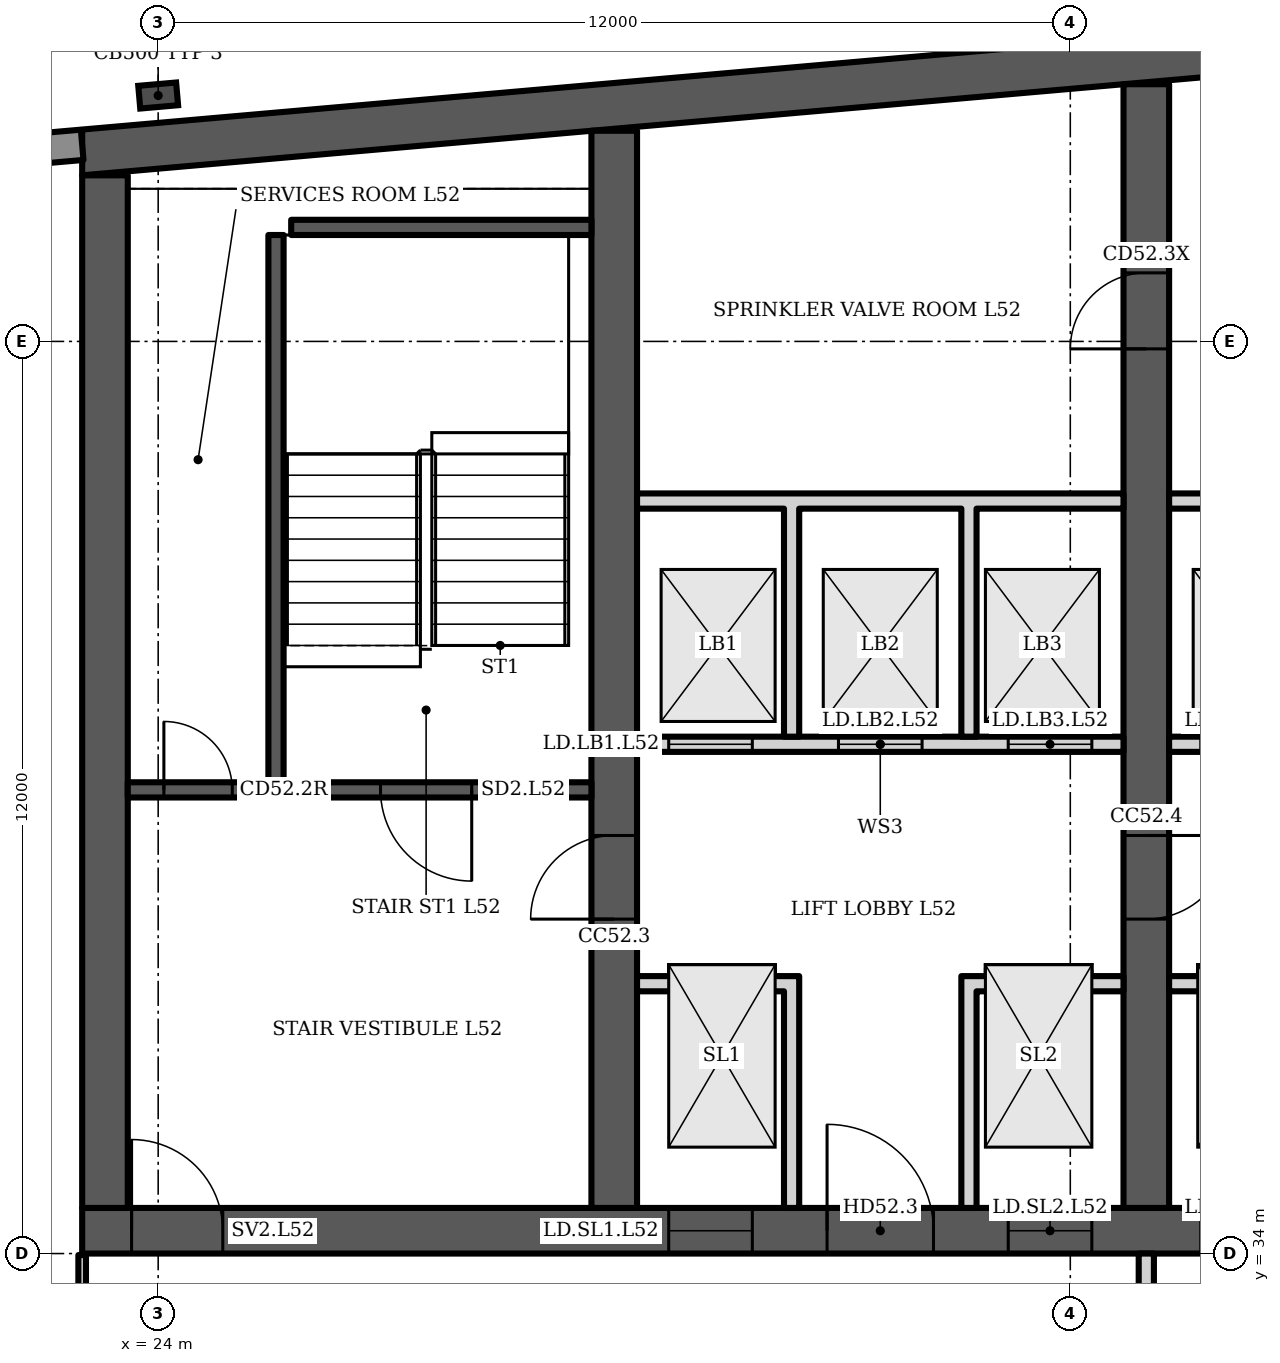
"""IFC4 building model, lengths in metres.
Left out: names, types, materials, properties, quantities, classifications, styles, units other than length and angle.
Written with IfcOpenShell. Run it as: python <this file> out.ifc"""

import sys

from ifc_helpers import new_model, si_unit, direction, frame, frame_2d, origin, origin_2d, place, context, subcontext, project, spatial, polyline, rectangle, i_section, outline, extrude, element, fill, save


model = new_model("IFC4")
c1 = context("Model", 3, precision=1e-05, world=origin(), true_north=direction((0.0, 1.0)))
c2 = subcontext(c1, "Body", "Model", "MODEL_VIEW")
j1 = project(units=[si_unit("LENGTHUNIT", "METRE"), si_unit("PLANEANGLEUNIT", "RADIAN")], contexts=[c1])
p1 = place(None, origin())
s1 = spatial("IfcSite", under=j1, at=p1, CompositionType="ELEMENT")
p2 = place(p1, origin())
s2 = spatial("IfcBuilding", under=s1, at=p2, CompositionType="ELEMENT")
p3 = place(p2, frame((0.0, 0.0, 210.7)))
s3 = spatial("IfcBuildingStorey", under=s2, at=p3, CompositionType="ELEMENT", Elevation=210.7)
p4 = place(p3, origin())
e1 = element("IfcWall", 1, at=p4, inside=s3, PredefinedType="SHEAR", context=c2, shape_type="SweptSolid", body=[
    extrude(outline(polyline([(23.0, 48.185), (40.5, 49.716), (58.0, 48.185), (58.0, 48.787), (40.5, 50.318), (23.0, 48.787), (23.0, 48.185)])), origin(), (0.0, 0.0, 1.0), 3.6),
])
p5 = place(p3, frame((23.0, 34.3, 0.0), z_axis=(0.0, 0.0, 1.0), x_axis=(1.0, 0.0, 0.0)))
e2 = element("IfcWall", 2, at=p5, inside=s3, PredefinedType="SHEAR", context=c2, shape_type="SweptSolid", body=[
    extrude(rectangle(XDim=35.0, YDim=0.6, at=frame_2d((17.5, 0.0))), origin(), (0.0, 0.0, 1.0), 3.6),
])
p6 = place(p5, frame((0.65, 0.0, 0.0)))
e3 = element("IfcOpeningElement", 3, at=p6, cuts=e2, PredefinedType="OPENING", context=c2, shape_type="SweptSolid", body=[
    extrude(rectangle(XDim=1.2, YDim=2.1, at=frame_2d((0.6, 1.05))), frame((0.0, 0.31, 0.0), z_axis=(0.0, -1.0, 0.0), x_axis=(1.0, 0.0, 0.0)), (0.0, 0.0, 1.0), 0.62),
])
p7 = place(p5, frame((7.717, 0.0, 0.0)))
e4 = element("IfcOpeningElement", 4, at=p7, cuts=e2, PredefinedType="OPENING", context=c2, shape_type="SweptSolid", body=[
    extrude(rectangle(XDim=1.1, YDim=2.1, at=frame_2d((0.55, 1.05))), frame((0.0, 0.31, 0.0), z_axis=(0.0, -1.0, 0.0), x_axis=(1.0, 0.0, 0.0)), (0.0, 0.0, 1.0), 0.62),
])
p8 = place(p5, frame((12.183, 0.0, 0.0)))
e5 = element("IfcOpeningElement", 5, at=p8, cuts=e2, PredefinedType="OPENING", context=c2, shape_type="SweptSolid", body=[
    extrude(rectangle(XDim=1.1, YDim=2.1, at=frame_2d((0.55, 1.05))), frame((0.0, 0.31, 0.0), z_axis=(0.0, -1.0, 0.0), x_axis=(1.0, 0.0, 0.0)), (0.0, 0.0, 1.0), 0.62),
])
p9 = place(p5, frame((9.8, 0.0, 0.0)))
e6 = element("IfcOpeningElement", 6, at=p9, cuts=e2, PredefinedType="OPENING", context=c2, shape_type="SweptSolid", body=[
    extrude(rectangle(XDim=1.4, YDim=2.1, at=frame_2d((0.7, 1.05))), frame((0.0, 0.31, 0.0), z_axis=(0.0, -1.0, 0.0), x_axis=(1.0, 0.0, 0.0)), (0.0, 0.0, 1.0), 0.62),
])
p10 = place(p5, frame((14.717, 0.0, 0.0)))
e7 = element("IfcOpeningElement", 7, at=p10, cuts=e2, PredefinedType="OPENING", context=c2, shape_type="SweptSolid", body=[
    extrude(rectangle(XDim=1.1, YDim=2.1, at=frame_2d((0.55, 1.05))), frame((0.0, 0.31, 0.0), z_axis=(0.0, -1.0, 0.0), x_axis=(1.0, 0.0, 0.0)), (0.0, 0.0, 1.0), 0.62),
])
p11 = place(p5, frame((16.95, 0.0, 0.0)))
e8 = element("IfcOpeningElement", 8, at=p11, cuts=e2, PredefinedType="OPENING", context=c2, shape_type="SweptSolid", body=[
    extrude(rectangle(XDim=1.1, YDim=2.1, at=frame_2d((0.55, 1.05))), frame((0.0, 0.31, 0.0), z_axis=(0.0, -1.0, 0.0), x_axis=(1.0, 0.0, 0.0)), (0.0, 0.0, 1.0), 0.62),
])
p12 = place(p5, frame((19.183, 0.0, 0.0)))
e9 = element("IfcOpeningElement", 9, at=p12, cuts=e2, PredefinedType="OPENING", context=c2, shape_type="SweptSolid", body=[
    extrude(rectangle(XDim=1.1, YDim=2.1, at=frame_2d((0.55, 1.05))), frame((0.0, 0.31, 0.0), z_axis=(0.0, -1.0, 0.0), x_axis=(1.0, 0.0, 0.0)), (0.0, 0.0, 1.0), 0.62),
])
p13 = place(p5, frame((26.15, 0.0, 0.0)))
e10 = element("IfcOpeningElement", 10, at=p13, cuts=e2, PredefinedType="OPENING", context=c2, shape_type="SweptSolid", body=[
    extrude(rectangle(XDim=1.2, YDim=2.1, at=frame_2d((0.6, 1.05))), frame((0.0, 0.31, 0.0), z_axis=(0.0, -1.0, 0.0), x_axis=(1.0, 0.0, 0.0)), (0.0, 0.0, 1.0), 0.62),
])
p14 = place(p5, frame((28.767, 0.0, 0.0)))
e11 = element("IfcOpeningElement", 11, at=p14, cuts=e2, PredefinedType="OPENING", context=c2, shape_type="SweptSolid", body=[
    extrude(rectangle(XDim=1.0, YDim=2.1, at=frame_2d((0.5, 1.05))), frame((0.0, 0.31, 0.0), z_axis=(0.0, -1.0, 0.0), x_axis=(1.0, 0.0, 0.0)), (0.0, 0.0, 1.0), 0.62),
])
p15 = place(p5, frame((33.083, 0.0, 0.0)))
e12 = element("IfcOpeningElement", 12, at=p15, cuts=e2, PredefinedType="OPENING", context=c2, shape_type="SweptSolid", body=[
    extrude(rectangle(XDim=1.0, YDim=2.1, at=frame_2d((0.5, 1.05))), frame((0.0, 0.31, 0.0), z_axis=(0.0, -1.0, 0.0), x_axis=(1.0, 0.0, 0.0)), (0.0, 0.0, 1.0), 0.62),
])
p16 = place(p5, frame((30.8, 0.0, 0.0)))
e13 = element("IfcOpeningElement", 13, at=p16, cuts=e2, PredefinedType="OPENING", context=c2, shape_type="SweptSolid", body=[
    extrude(rectangle(XDim=1.4, YDim=2.1, at=frame_2d((0.7, 1.05))), frame((0.0, 0.31, 0.0), z_axis=(0.0, -1.0, 0.0), x_axis=(1.0, 0.0, 0.0)), (0.0, 0.0, 1.0), 0.62),
])
p17 = place(p3, frame((23.3, 34.6, 0.0), z_axis=(0.0, 0.0, 1.0), x_axis=(0.0, 1.0, 0.0)))
e14 = element("IfcWall", 14, at=p17, inside=s3, PredefinedType="SHEAR", context=c2, shape_type="SweptSolid", body=[
    extrude(rectangle(XDim=13.585, YDim=0.6, at=frame_2d((6.792, 0.0))), origin(), (0.0, 0.0, 1.0), 3.6),
])
p18 = place(p3, frame((30.0, 34.6, 0.0), z_axis=(0.0, 0.0, 1.0), x_axis=(0.0, 1.0, 0.0)))
e15 = element("IfcWall", 15, at=p18, inside=s3, PredefinedType="SHEAR", context=c2, shape_type="SweptSolid", body=[
    extrude(rectangle(XDim=14.171, YDim=0.6, at=frame_2d((7.085, 0.0))), origin(), (0.0, 0.0, 1.0), 3.6),
])
p19 = place(p18, frame((3.8, 0.0, 0.0)))
e16 = element("IfcOpeningElement", 16, at=p19, cuts=e15, PredefinedType="OPENING", context=c2, shape_type="SweptSolid", body=[
    extrude(rectangle(XDim=1.1, YDim=2.1, at=frame_2d((0.55, 1.05))), frame((0.0, 0.31, 0.0), z_axis=(0.0, -1.0, 0.0), x_axis=(1.0, 0.0, 0.0)), (0.0, 0.0, 1.0), 0.62),
])
p20 = place(p3, frame((37.0, 34.6, 0.0), z_axis=(0.0, 0.0, 1.0), x_axis=(0.0, 1.0, 0.0)))
e17 = element("IfcWall", 17, at=p20, inside=s3, PredefinedType="SHEAR", context=c2, shape_type="SweptSolid", body=[
    extrude(rectangle(XDim=14.784, YDim=0.6, at=frame_2d((7.392, 0.0))), origin(), (0.0, 0.0, 1.0), 3.6),
])
p21 = place(p20, frame((11.302, 0.0, 0.0)))
e18 = element("IfcOpeningElement", 18, at=p21, cuts=e17, PredefinedType="OPENING", context=c2, shape_type="SweptSolid", body=[
    extrude(rectangle(XDim=1.0, YDim=2.1, at=frame_2d((0.5, 1.05))), frame((0.0, 0.31, 0.0), z_axis=(0.0, -1.0, 0.0), x_axis=(1.0, 0.0, 0.0)), (0.0, 0.0, 1.0), 0.62),
])
p22 = place(p20, frame((3.8, 0.0, 0.0)))
e19 = element("IfcOpeningElement", 19, at=p22, cuts=e17, PredefinedType="OPENING", context=c2, shape_type="SweptSolid", body=[
    extrude(rectangle(XDim=1.1, YDim=2.1, at=frame_2d((0.55, 1.05))), frame((0.0, 0.31, 0.0), z_axis=(0.0, -1.0, 0.0), x_axis=(1.0, 0.0, 0.0)), (0.0, 0.0, 1.0), 0.62),
])
p23 = place(p3, frame((24.0, 49.235, 0.0), z_axis=(0.0, 0.0, 1.0), x_axis=(-0.087156, 0.996197, 0.0)))
e20 = element("IfcColumn", 20, at=p23, inside=s3, PredefinedType="COLUMN", context=c2, shape_type="SweptSolid", body=[
    extrude(i_section(OverallWidth=0.3, OverallDepth=0.5, WebThickness=0.014, FlangeThickness=0.028, FilletRadius=0.027, at=origin_2d()), origin(), (0.0, 0.0, 1.0), 3.6),
])
p24 = place(p3, frame((23.0, 48.587, 0.0), z_axis=(0.0, 0.0, 1.0), x_axis=(-0.996194, -0.087168, 0.0)))
e21 = element("IfcWall", 21, at=p24, inside=s3, PredefinedType="SOLIDWALL", context=c2, shape_type="SweptSolid", body=[
    extrude(rectangle(XDim=2.994, YDim=0.4, at=frame_2d((1.497, 0.0))), origin(), (0.0, 0.0, 1.0), 3.2),
])
p25 = place(p3, frame((23.6, 40.1, 0.0), z_axis=(0.0, 0.0, 1.0), x_axis=(1.0, 0.0, 0.0)))
e22 = element("IfcWall", 22, at=p25, inside=s3, PredefinedType="SHEAR", context=c2, shape_type="SweptSolid", body=[
    extrude(rectangle(XDim=6.1, YDim=0.2, at=frame_2d((3.05, 0.0))), origin(), (0.0, 0.0, 1.0), 3.2),
])
p26 = place(p25, frame((3.325, 0.0, 0.0)))
e23 = element("IfcOpeningElement", 23, at=p26, cuts=e22, PredefinedType="OPENING", context=c2, shape_type="SweptSolid", body=[
    extrude(rectangle(XDim=1.2, YDim=2.1, at=frame_2d((0.6, 1.05))), frame((0.0, 0.11, 0.0), z_axis=(0.0, -1.0, 0.0), x_axis=(1.0, 0.0, 0.0)), (0.0, 0.0, 1.0), 0.22),
])
p27 = place(p25, frame((0.475, 0.0, 0.0)))
e24 = element("IfcOpeningElement", 24, at=p27, cuts=e22, PredefinedType="OPENING", context=c2, shape_type="SweptSolid", body=[
    extrude(rectangle(XDim=0.9, YDim=2.1, at=frame_2d((0.45, 1.05))), frame((0.0, 0.11, 0.0), z_axis=(0.0, -1.0, 0.0), x_axis=(1.0, 0.0, 0.0)), (0.0, 0.0, 1.0), 0.22),
])
p28 = place(p3, frame((25.55, 40.2, 0.0), z_axis=(0.0, 0.0, 1.0), x_axis=(0.0, 1.0, 0.0)))
e25 = element("IfcWall", 25, at=p28, inside=s3, PredefinedType="SHEAR", context=c2, shape_type="SweptSolid", body=[
    extrude(rectangle(XDim=7.2, YDim=0.2, at=frame_2d((3.6, 0.0))), origin(), (0.0, 0.0, 1.0), 3.2),
])
p29 = place(p3, frame((25.75, 47.5, 0.0), z_axis=(0.0, 0.0, 1.0), x_axis=(1.0, 0.0, 0.0)))
e26 = element("IfcWall", 26, at=p29, inside=s3, PredefinedType="SHEAR", context=c2, shape_type="SweptSolid", body=[
    extrude(rectangle(XDim=3.95, YDim=0.2, at=frame_2d((1.975, 0.0))), origin(), (0.0, 0.0, 1.0), 3.2),
])
p30 = place(p3, frame((30.3, 40.7, 0.0), z_axis=(0.0, 0.0, 1.0), x_axis=(1.0, 0.0, 0.0)))
e27 = element("IfcWall", 27, at=p30, inside=s3, PredefinedType="PARTITIONING", context=c2, shape_type="SweptSolid", body=[
    extrude(rectangle(XDim=6.4, YDim=0.2, at=frame_2d((3.2, 0.0))), origin(), (0.0, 0.0, 1.0), 3.2),
])
p31 = place(p30, frame((0.417, 0.0, 0.0)))
e28 = element("IfcOpeningElement", 28, at=p31, cuts=e27, PredefinedType="OPENING", context=c2, shape_type="SweptSolid", body=[
    extrude(rectangle(XDim=1.1, YDim=2.1, at=frame_2d((0.55, 1.05))), frame((0.0, 0.11, 0.0), z_axis=(0.0, -1.0, 0.0), x_axis=(1.0, 0.0, 0.0)), (0.0, 0.0, 1.0), 0.22),
])
p32 = place(p30, frame((2.65, 0.0, 0.0)))
e29 = element("IfcOpeningElement", 29, at=p32, cuts=e27, PredefinedType="OPENING", context=c2, shape_type="SweptSolid", body=[
    extrude(rectangle(XDim=1.1, YDim=2.1, at=frame_2d((0.55, 1.05))), frame((0.0, 0.11, 0.0), z_axis=(0.0, -1.0, 0.0), x_axis=(1.0, 0.0, 0.0)), (0.0, 0.0, 1.0), 0.22),
])
p33 = place(p30, frame((4.883, 0.0, 0.0)))
e30 = element("IfcOpeningElement", 30, at=p33, cuts=e27, PredefinedType="OPENING", context=c2, shape_type="SweptSolid", body=[
    extrude(rectangle(XDim=1.1, YDim=2.1, at=frame_2d((0.55, 1.05))), frame((0.0, 0.11, 0.0), z_axis=(0.0, -1.0, 0.0), x_axis=(1.0, 0.0, 0.0)), (0.0, 0.0, 1.0), 0.22),
])
p34 = place(p3, frame((0.0, 0.0, -0.0)))
e31 = element("IfcWall", 31, at=p34, inside=s3, PredefinedType="PARTITIONING", context=c2, shape_type="SweptSolid", body=[
    extrude(outline(polyline([(32.233, 37.45), (30.3, 37.45), (30.3, 37.65), (32.233, 37.65), (32.433, 37.65), (32.433, 34.6), (32.233, 34.6), (32.233, 37.45)])), origin(), (0.0, 0.0, 1.0), 3.2),
])
p35 = place(p3, frame((0.0, 0.0, -0.0)))
e32 = element("IfcWall", 32, at=p35, inside=s3, PredefinedType="PARTITIONING", context=c2, shape_type="SweptSolid", body=[
    extrude(outline(polyline([(34.567, 37.65), (34.767, 37.65), (36.7, 37.65), (36.7, 37.45), (34.767, 37.45), (34.767, 34.6), (34.567, 34.6), (34.567, 37.65)])), origin(), (0.0, 0.0, 1.0), 3.2),
])
p36 = place(p3, frame((0.0, 0.0, -0.0)))
e33 = element("IfcWall", 33, at=p36, inside=s3, PredefinedType="PARTITIONING", context=c2, shape_type="SweptSolid", body=[
    extrude(outline(polyline([(32.433, 40.8), (32.233, 40.8), (32.233, 43.8), (30.3, 43.8), (30.3, 44.0), (36.7, 44.0), (36.7, 43.8), (34.767, 43.8), (34.767, 40.8), (34.567, 40.8), (34.567, 43.8), (32.433, 43.8), (32.433, 40.8)])), origin(), (0.0, 0.0, 1.0), 3.2),
])
p37 = place(p3, frame((37.3, 40.7, 0.0), z_axis=(0.0, 0.0, 1.0), x_axis=(1.0, 0.0, 0.0)))
e34 = element("IfcWall", 34, at=p37, inside=s3, PredefinedType="PARTITIONING", context=c2, shape_type="SweptSolid", body=[
    extrude(rectangle(XDim=6.4, YDim=0.2, at=frame_2d((3.2, 0.0))), origin(), (0.0, 0.0, 1.0), 3.2),
])
p38 = place(p37, frame((0.417, 0.0, 0.0)))
e35 = element("IfcOpeningElement", 35, at=p38, cuts=e34, PredefinedType="OPENING", context=c2, shape_type="SweptSolid", body=[
    extrude(rectangle(XDim=1.1, YDim=2.1, at=frame_2d((0.55, 1.05))), frame((0.0, 0.11, 0.0), z_axis=(0.0, -1.0, 0.0), x_axis=(1.0, 0.0, 0.0)), (0.0, 0.0, 1.0), 0.22),
])
p39 = place(p37, frame((2.65, 0.0, 0.0)))
e36 = element("IfcOpeningElement", 36, at=p39, cuts=e34, PredefinedType="OPENING", context=c2, shape_type="SweptSolid", body=[
    extrude(rectangle(XDim=1.1, YDim=2.1, at=frame_2d((0.55, 1.05))), frame((0.0, 0.11, 0.0), z_axis=(0.0, -1.0, 0.0), x_axis=(1.0, 0.0, 0.0)), (0.0, 0.0, 1.0), 0.22),
])
p40 = place(p37, frame((4.883, 0.0, 0.0)))
e37 = element("IfcOpeningElement", 37, at=p40, cuts=e34, PredefinedType="OPENING", context=c2, shape_type="SweptSolid", body=[
    extrude(rectangle(XDim=1.1, YDim=2.1, at=frame_2d((0.55, 1.05))), frame((0.0, 0.11, 0.0), z_axis=(0.0, -1.0, 0.0), x_axis=(1.0, 0.0, 0.0)), (0.0, 0.0, 1.0), 0.22),
])
p41 = place(p3, frame((0.0, 0.0, -0.0)))
e38 = element("IfcWall", 38, at=p41, inside=s3, PredefinedType="PARTITIONING", context=c2, shape_type="SweptSolid", body=[
    extrude(outline(polyline([(41.567, 37.1), (39.433, 37.1), (39.433, 34.6), (39.233, 34.6), (39.233, 37.45), (37.3, 37.45), (37.3, 37.65), (39.233, 37.65), (39.433, 37.65), (39.433, 37.3), (41.567, 37.3), (41.567, 37.35), (41.767, 37.35), (43.7, 37.35), (43.7, 37.15), (41.767, 37.15), (41.767, 34.6), (41.567, 34.6), (41.567, 37.1)])), origin(), (0.0, 0.0, 1.0), 3.2),
])
p42 = place(p3, frame((0.0, 0.0, -0.0)))
e39 = element("IfcWall", 39, at=p42, inside=s3, PredefinedType="PARTITIONING", context=c2, shape_type="SweptSolid", body=[
    extrude(outline(polyline([(39.433, 40.8), (39.233, 40.8), (39.233, 43.8), (37.3, 43.8), (37.3, 44.0), (43.7, 44.0), (43.7, 43.8), (41.767, 43.8), (41.767, 40.8), (41.567, 40.8), (41.567, 43.8), (39.433, 43.8), (39.433, 40.8)])), origin(), (0.0, 0.0, 1.0), 3.2),
])
p43 = place(p3, frame((37.0, 30.5, 0.0), z_axis=(0.0, 0.0, 1.0), x_axis=(0.0, 1.0, 0.0)))
e40 = element("IfcWall", 40, at=p43, inside=s3, PredefinedType="PARTITIONING", context=c2, shape_type="SweptSolid", body=[
    extrude(rectangle(XDim=3.5, YDim=0.2, at=frame_2d((1.75, 0.0))), origin(), (0.0, 0.0, 1.0), 3.2),
])
p44 = place(p43, frame((1.2, 0.0, 0.0)))
e41 = element("IfcOpeningElement", 41, at=p44, cuts=e40, PredefinedType="OPENING", context=c2, shape_type="SweptSolid", body=[
    extrude(rectangle(XDim=1.1, YDim=2.1, at=frame_2d((0.55, 1.05))), frame((0.0, 0.11, 0.0), z_axis=(0.0, -1.0, 0.0), x_axis=(1.0, 0.0, 0.0)), (0.0, 0.0, 1.0), 0.22),
])
p45 = place(p3, frame((23.0, 30.5, 0.0), z_axis=(0.0, 0.0, 1.0), x_axis=(0.0, 1.0, 0.0)))
e42 = element("IfcWall", 42, at=p45, inside=s3, PredefinedType="PARTITIONING", context=c2, shape_type="SweptSolid", body=[
    extrude(rectangle(XDim=3.48, YDim=0.1, at=frame_2d((1.74, 0.0))), origin(), (0.0, 0.0, 1.0), 3.2),
])
p46 = place(p45, frame((0.28, 0.0, 0.0)))
e43 = element("IfcOpeningElement", 43, at=p46, cuts=e42, PredefinedType="OPENING", context=c2, shape_type="SweptSolid", body=[
    extrude(rectangle(XDim=1.0, YDim=2.1, at=frame_2d((0.5, 1.05))), frame((0.0, 0.06, 0.0), z_axis=(0.0, -1.0, 0.0), x_axis=(1.0, 0.0, 0.0)), (0.0, 0.0, 1.0), 0.12),
])
p47 = place(p26, origin())
e44 = element("IfcDoor", 44, at=p47, inside=s3, OperationType="SINGLE_SWING_RIGHT", PredefinedType="DOOR", context=c2, shape_type="SweptSolid", body=[
    extrude(rectangle(XDim=1.2, YDim=2.1, at=frame_2d((0.6, 1.05))), frame((0.0, 0.025, 0.0), z_axis=(0.0, -1.0, 0.0), x_axis=(1.0, 0.0, 0.0)), (0.0, 0.0, 1.0), 0.05),
])
fill(e23, e44)
p48 = place(p27, origin())
e45 = element("IfcDoor", 45, at=p48, inside=s3, OperationType="SINGLE_SWING_LEFT", PredefinedType="DOOR", context=c2, shape_type="SweptSolid", body=[
    extrude(rectangle(XDim=0.9, YDim=2.1, at=frame_2d((0.45, 1.05))), frame((0.0, 0.025, 0.0), z_axis=(0.0, -1.0, 0.0), x_axis=(1.0, 0.0, 0.0)), (0.0, 0.0, 1.0), 0.05),
])
fill(e24, e45)
p49 = place(p6, origin())
e46 = element("IfcDoor", 46, at=p49, inside=s3, OperationType="SINGLE_SWING_LEFT", PredefinedType="DOOR", context=c2, shape_type="SweptSolid", body=[
    extrude(rectangle(XDim=1.2, YDim=2.1, at=frame_2d((0.6, 1.05))), frame((0.0, 0.025, 0.0), z_axis=(0.0, -1.0, 0.0), x_axis=(1.0, 0.0, 0.0)), (0.0, 0.0, 1.0), 0.05),
])
fill(e3, e46)
p50 = place(p7, origin())
e47 = element("IfcDoor", 47, at=p50, inside=s3, OperationType="DOUBLE_DOOR_SLIDING", PredefinedType="DOOR", context=c2, shape_type="SweptSolid", body=[
    extrude(rectangle(XDim=1.1, YDim=2.1, at=frame_2d((0.55, 1.05))), frame((0.0, 0.025, 0.0), z_axis=(0.0, -1.0, 0.0), x_axis=(1.0, 0.0, 0.0)), (0.0, 0.0, 1.0), 0.05),
])
fill(e4, e47)
p51 = place(p8, origin())
e48 = element("IfcDoor", 48, at=p51, inside=s3, OperationType="DOUBLE_DOOR_SLIDING", PredefinedType="DOOR", context=c2, shape_type="SweptSolid", body=[
    extrude(rectangle(XDim=1.1, YDim=2.1, at=frame_2d((0.55, 1.05))), frame((0.0, 0.025, 0.0), z_axis=(0.0, -1.0, 0.0), x_axis=(1.0, 0.0, 0.0)), (0.0, 0.0, 1.0), 0.05),
])
fill(e5, e48)
p52 = place(p9, origin())
e49 = element("IfcDoor", 49, at=p52, inside=s3, OperationType="DOUBLE_DOOR_SINGLE_SWING", PredefinedType="DOOR", context=c2, shape_type="SweptSolid", body=[
    extrude(rectangle(XDim=1.4, YDim=2.1, at=frame_2d((0.7, 1.05))), frame((0.0, 0.025, 0.0), z_axis=(0.0, -1.0, 0.0), x_axis=(1.0, 0.0, 0.0)), (0.0, 0.0, 1.0), 0.05),
])
fill(e6, e49)
p53 = place(p31, origin())
e50 = element("IfcDoor", 50, at=p53, inside=s3, OperationType="DOUBLE_DOOR_SLIDING", PredefinedType="DOOR", context=c2, shape_type="SweptSolid", body=[
    extrude(rectangle(XDim=1.1, YDim=2.1, at=frame_2d((0.55, 1.05))), frame((0.0, 0.025, 0.0), z_axis=(0.0, -1.0, 0.0), x_axis=(1.0, 0.0, 0.0)), (0.0, 0.0, 1.0), 0.05),
])
fill(e28, e50)
p54 = place(p32, origin())
e51 = element("IfcDoor", 51, at=p54, inside=s3, OperationType="DOUBLE_DOOR_SLIDING", PredefinedType="DOOR", context=c2, shape_type="SweptSolid", body=[
    extrude(rectangle(XDim=1.1, YDim=2.1, at=frame_2d((0.55, 1.05))), frame((0.0, 0.025, 0.0), z_axis=(0.0, -1.0, 0.0), x_axis=(1.0, 0.0, 0.0)), (0.0, 0.0, 1.0), 0.05),
])
fill(e29, e51)
p55 = place(p33, origin())
e52 = element("IfcDoor", 52, at=p55, inside=s3, OperationType="DOUBLE_DOOR_SLIDING", PredefinedType="DOOR", context=c2, shape_type="SweptSolid", body=[
    extrude(rectangle(XDim=1.1, YDim=2.1, at=frame_2d((0.55, 1.05))), frame((0.0, 0.025, 0.0), z_axis=(0.0, -1.0, 0.0), x_axis=(1.0, 0.0, 0.0)), (0.0, 0.0, 1.0), 0.05),
])
fill(e30, e52)
p56 = place(p21, origin())
e53 = element("IfcDoor", 53, at=p56, inside=s3, OperationType="SINGLE_SWING_LEFT", PredefinedType="DOOR", context=c2, shape_type="SweptSolid", body=[
    extrude(rectangle(XDim=1.0, YDim=2.1, at=frame_2d((0.5, 1.05))), frame((0.0, 0.025, 0.0), z_axis=(0.0, -1.0, 0.0), x_axis=(1.0, 0.0, 0.0)), (0.0, 0.0, 1.0), 0.05),
])
fill(e18, e53)
p57 = place(p19, origin())
e54 = element("IfcDoor", 54, at=p57, inside=s3, OperationType="SINGLE_SWING_LEFT", PredefinedType="DOOR", context=c2, shape_type="SweptSolid", body=[
    extrude(rectangle(XDim=1.1, YDim=2.1, at=frame_2d((0.55, 1.05))), frame((0.0, 0.025, 0.0), z_axis=(0.0, -1.0, 0.0), x_axis=(1.0, 0.0, 0.0)), (0.0, 0.0, 1.0), 0.05),
])
fill(e16, e54)
p58 = place(p22, origin())
e55 = element("IfcDoor", 55, at=p58, inside=s3, OperationType="SINGLE_SWING_RIGHT", PredefinedType="DOOR", context=c2, shape_type="SweptSolid", body=[
    extrude(rectangle(XDim=1.1, YDim=2.1, at=frame_2d((0.55, 1.05))), frame((0.0, 0.025, 0.0), z_axis=(0.0, -1.0, 0.0), x_axis=(1.0, 0.0, 0.0)), (0.0, 0.0, 1.0), 0.05),
])
fill(e19, e55)
save(model, sys.argv[1])
